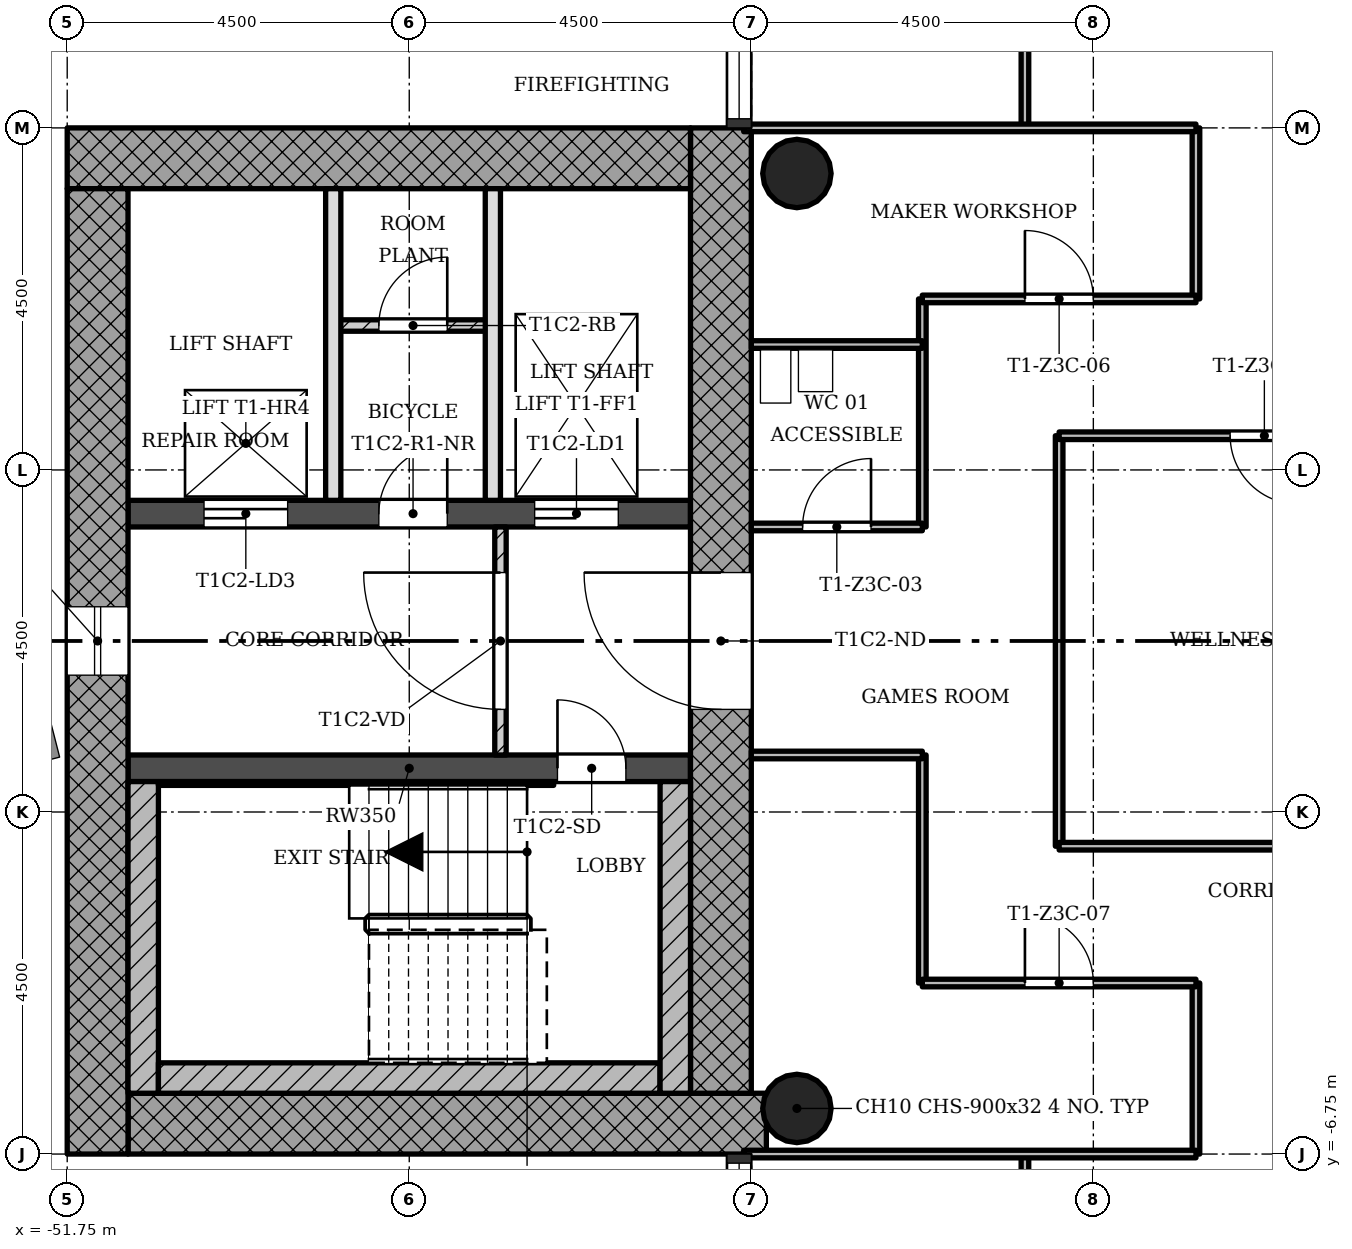
"""IFC4 building model, lengths in metres.
Left out: names, types, materials, properties, quantities, classifications, styles, units other than length and angle.
Written with IfcOpenShell. Run it as: python <this file> out.ifc"""

import sys

from ifc_helpers import new_model, si_unit, direction, frame, frame_2d, origin, origin_2d, place, context, subcontext, project, spatial, rectangle, hollow_circle, extrude, element, fill, save


model = new_model("IFC4")
c1 = context("Model", 3, precision=1e-05, world=origin(), true_north=direction((0.0, 1.0)))
c2 = subcontext(c1, "Body", "Model", "MODEL_VIEW")
j1 = project(units=[si_unit("LENGTHUNIT", "METRE"), si_unit("PLANEANGLEUNIT", "RADIAN")], contexts=[c1])
p1 = place(None, origin())
s1 = spatial("IfcSite", under=j1, at=p1, CompositionType="ELEMENT")
p2 = place(p1, origin())
s2 = spatial("IfcBuilding", under=s1, at=p2, CompositionType="ELEMENT")
p3 = place(p2, frame((0.0, 0.0, 157.5)))
s3 = spatial("IfcBuildingStorey", under=s2, at=p3, CompositionType="ELEMENT", Elevation=157.5)
p4 = place(p3, frame((-50.95, -6.35, 0.0), z_axis=(0.0, 0.0, 1.0), x_axis=(1.0, 0.0, 0.0)))
e1 = element("IfcWall", 1, at=p4, inside=s3, PredefinedType="SHEAR", context=c2, shape_type="SweptSolid", body=[
    extrude(rectangle(XDim=8.398, YDim=0.8, at=frame_2d((4.199, 0.0))), origin(), (0.0, 0.0, 1.0), 3.4),
])
p5 = place(p3, frame((-43.15, -5.95, 0.0), z_axis=(0.0, 0.0, 1.0), x_axis=(0.0, 1.0, 0.0)))
e2 = element("IfcWall", 2, at=p5, inside=s3, PredefinedType="SHEAR", context=c2, shape_type="SweptSolid", body=[
    extrude(rectangle(XDim=12.7, YDim=0.8, at=frame_2d((6.35, 0.0))), origin(), (0.0, 0.0, 1.0), 3.4),
])
p6 = place(p5, frame((5.05, 0.0, 0.0)))
e3 = element("IfcOpeningElement", 3, at=p6, cuts=e2, PredefinedType="OPENING", context=c2, shape_type="SweptSolid", body=[
    extrude(rectangle(XDim=1.8, YDim=2.1, at=frame_2d((0.9, 1.05))), frame((0.0, 0.41, 0.0), z_axis=(0.0, -1.0, 0.0), x_axis=(1.0, 0.0, 0.0)), (0.0, 0.0, 1.0), 0.82),
])
p7 = place(p3, frame((-43.55, 6.35, 0.0), z_axis=(0.0, 0.0, 1.0), x_axis=(-1.0, 0.0, 0.0)))
e4 = element("IfcWall", 4, at=p7, inside=s3, PredefinedType="SHEAR", context=c2, shape_type="SweptSolid", body=[
    extrude(rectangle(XDim=8.2, YDim=0.8, at=frame_2d((4.1, 0.0))), origin(), (0.0, 0.0, 1.0), 3.4),
])
p8 = place(p3, frame((-51.35, 5.95, 0.0), z_axis=(0.0, 0.0, 1.0), x_axis=(0.0, -1.0, 0.0)))
e5 = element("IfcWall", 5, at=p8, inside=s3, PredefinedType="SHEAR", context=c2, shape_type="SweptSolid", body=[
    extrude(rectangle(XDim=12.7, YDim=0.8, at=frame_2d((6.35, 0.0))), origin(), (0.0, 0.0, 1.0), 3.4),
])
p9 = place(p8, frame((5.5, 0.0, 0.45)))
e6 = element("IfcOpeningElement", 6, at=p9, cuts=e5, PredefinedType="OPENING", context=c2, shape_type="SweptSolid", body=[
    extrude(rectangle(XDim=0.9, YDim=2.4, at=frame_2d((0.45, 1.2))), frame((0.0, 0.41, 0.0), z_axis=(0.0, -1.0, 0.0), x_axis=(1.0, 0.0, 0.0)), (0.0, 0.0, 1.0), 0.82),
])
p10 = place(p3, frame((-50.95, -1.675, 0.0), z_axis=(0.0, 0.0, 1.0), x_axis=(1.0, 0.0, 0.0)))
e7 = element("IfcWall", 7, at=p10, inside=s3, PredefinedType="SHEAR", context=c2, shape_type="SweptSolid", body=[
    extrude(rectangle(XDim=7.4, YDim=0.35, at=frame_2d((3.7, 0.0))), origin(), (0.0, 0.0, 1.0), 3.4),
])
p11 = place(p10, frame((5.65, 0.0, 0.0)))
e8 = element("IfcOpeningElement", 8, at=p11, cuts=e7, PredefinedType="OPENING", context=c2, shape_type="SweptSolid", body=[
    extrude(rectangle(XDim=0.9, YDim=2.1, at=frame_2d((0.45, 1.05))), frame((0.0, 0.185, 0.0), z_axis=(0.0, -1.0, 0.0), x_axis=(1.0, 0.0, 0.0)), (0.0, 0.0, 1.0), 0.37),
])
p12 = place(p3, frame((-50.95, 1.675, 0.0), z_axis=(0.0, 0.0, 1.0), x_axis=(1.0, 0.0, 0.0)))
e9 = element("IfcWall", 9, at=p12, inside=s3, PredefinedType="SHEAR", context=c2, shape_type="SweptSolid", body=[
    extrude(rectangle(XDim=7.4, YDim=0.35, at=frame_2d((3.7, 0.0))), origin(), (0.0, 0.0, 1.0), 3.4),
])
p13 = place(p12, frame((5.35, 0.0, 0.0)))
e10 = element("IfcOpeningElement", 10, at=p13, cuts=e9, PredefinedType="OPENING", context=c2, shape_type="SweptSolid", body=[
    extrude(rectangle(XDim=1.1, YDim=2.1, at=frame_2d((0.55, 1.05))), frame((0.0, 0.185, 0.0), z_axis=(0.0, -1.0, 0.0), x_axis=(1.0, 0.0, 0.0)), (0.0, 0.0, 1.0), 0.37),
])
p14 = place(p12, frame((1.0, 0.0, 0.0)))
e11 = element("IfcOpeningElement", 11, at=p14, cuts=e9, PredefinedType="OPENING", context=c2, shape_type="SweptSolid", body=[
    extrude(rectangle(XDim=1.1, YDim=2.1, at=frame_2d((0.55, 1.05))), frame((0.0, 0.185, 0.0), z_axis=(0.0, -1.0, 0.0), x_axis=(1.0, 0.0, 0.0)), (0.0, 0.0, 1.0), 0.37),
])
p15 = place(p12, frame((3.3, 0.0, 0.0)))
e12 = element("IfcOpeningElement", 12, at=p15, cuts=e9, PredefinedType="OPENING", context=c2, shape_type="SweptSolid", body=[
    extrude(rectangle(XDim=0.9, YDim=2.1, at=frame_2d((0.45, 1.05))), frame((0.0, 0.185, 0.0), z_axis=(0.0, -1.0, 0.0), x_axis=(1.0, 0.0, 0.0)), (0.0, 0.0, 1.0), 0.37),
])
for number, where, z_axis, x_axis in (
    (13, (-42.15, -6.15, 0.0), (0.0, 0.0, 1.0), (1.0, 0.0, 0.0)),
    (14, (-42.15, 6.15, 0.0), (0.0, 0.0, 1.0), (1.0, 0.0, 0.0)),
):
    element("IfcColumn", number, at=place(p3, frame(where, z_axis=z_axis, x_axis=x_axis)), inside=s3, PredefinedType="COLUMN", context=c2, shape_type="SweptSolid", body=[
        extrude(hollow_circle(Radius=0.45, WallThickness=0.032, at=origin_2d()), origin(), (0.0, 0.0, 1.0), 3.4),
    ])
p16 = place(p3, frame((-46.05, 1.5, 0.0), z_axis=(0.0, 0.0, 1.0), x_axis=(0.0, -1.0, 0.0)))
e15 = element("IfcWall", 15, at=p16, inside=s3, PredefinedType="PARTITIONING", context=c2, shape_type="SweptSolid", body=[
    extrude(rectangle(XDim=3.0, YDim=0.15, at=frame_2d((1.5, 0.0))), origin(), (0.0, 0.0, 1.0), 3.0),
])
p17 = place(p16, frame((0.6, 0.0, 0.0)))
e16 = element("IfcOpeningElement", 16, at=p17, cuts=e15, PredefinedType="OPENING", context=c2, shape_type="SweptSolid", body=[
    extrude(rectangle(XDim=1.8, YDim=2.1, at=frame_2d((0.9, 1.05))), frame((0.0, 0.085, 0.0), z_axis=(0.0, -1.0, 0.0), x_axis=(1.0, 0.0, 0.0)), (0.0, 0.0, 1.0), 0.17),
])
for number, where, z_axis, x_axis in (
    (17, (-48.25, 5.95, 0.0), (0.0, 0.0, 1.0), (0.0, -1.0, 0.0)),
    (18, (-46.15, 5.95, 0.0), (0.0, 0.0, 1.0), (0.0, -1.0, 0.0)),
):
    element("IfcWall", number, at=place(p3, frame(where, z_axis=z_axis, x_axis=x_axis)), inside=s3, PredefinedType="SOLIDWALL", context=c2, shape_type="SweptSolid", body=[
        extrude(rectangle(XDim=4.1, YDim=0.2, at=frame_2d((2.05, 0.0))), origin(), (0.0, 0.0, 1.0), 3.0),
    ])
p18 = place(p3, frame((-46.15, 4.15, 0.0), z_axis=(0.0, 0.0, 1.0), x_axis=(-1.0, 0.0, 0.0)))
e19 = element("IfcWall", 19, at=p18, inside=s3, PredefinedType="PARTITIONING", context=c2, shape_type="SweptSolid", body=[
    extrude(rectangle(XDim=2.1, YDim=0.15, at=frame_2d((1.05, 0.0))), origin(), (0.0, 0.0, 1.0), 3.0),
])
p19 = place(p18, frame((0.6, 0.0, 0.0)))
e20 = element("IfcOpeningElement", 20, at=p19, cuts=e19, PredefinedType="OPENING", context=c2, shape_type="SweptSolid", body=[
    extrude(rectangle(XDim=0.9, YDim=2.1, at=frame_2d((0.45, 1.05))), frame((0.0, 0.085, 0.0), z_axis=(0.0, -1.0, 0.0), x_axis=(1.0, 0.0, 0.0)), (0.0, 0.0, 1.0), 0.17),
])
for number, where, z_axis, x_axis in (
    (21, (-40.5, -4.5, 0.0), (0.0, 0.0, 1.0), (0.0, 1.0, 0.0)),
    (22, (-40.5, 1.5, 0.0), (0.0, 0.0, 1.0), (0.0, 1.0, 0.0)),
):
    element("IfcWall", number, at=place(p3, frame(where, z_axis=z_axis, x_axis=x_axis)), inside=s3, PredefinedType="PARTITIONING", context=c2, shape_type="SweptSolid", body=[
        extrude(rectangle(XDim=3.0, YDim=0.1, at=frame_2d((1.5, 0.0))), origin(), (0.0, 0.0, 1.0), 3.0),
    ])
p20 = place(p3, frame((-39.15, -15.75, 0.0), z_axis=(0.0, 0.0, 1.0), x_axis=(0.0, 1.0, 0.0)))
e23 = element("IfcWall", 23, at=p20, inside=s3, PredefinedType="PARTITIONING", context=c2, shape_type="SweptSolid", body=[
    extrude(rectangle(XDim=9.0, YDim=0.1, at=frame_2d((4.5, 0.0))), origin(), (0.0, 0.0, 1.0), 3.0),
])
p21 = place(p20, frame((5.55, 0.0, 0.0)))
e24 = element("IfcOpeningElement", 24, at=p21, cuts=e23, PredefinedType="OPENING", context=c2, shape_type="SweptSolid", body=[
    extrude(rectangle(XDim=0.9, YDim=2.1, at=frame_2d((0.45, 1.05))), frame((0.0, 0.06, 0.0), z_axis=(0.0, -1.0, 0.0), x_axis=(1.0, 0.0, 0.0)), (0.0, 0.0, 1.0), 0.12),
])
p22 = place(p3, frame((-39.15, 6.75, 0.0), z_axis=(0.0, 0.0, 1.0), x_axis=(0.0, 1.0, 0.0)))
e25 = element("IfcWall", 25, at=p22, inside=s3, PredefinedType="PARTITIONING", context=c2, shape_type="SweptSolid", body=[
    extrude(rectangle(XDim=4.5, YDim=0.1, at=frame_2d((2.25, 0.0))), origin(), (0.0, 0.0, 1.0), 3.0),
])
p23 = place(p22, frame((1.8, 0.0, 0.0)))
e26 = element("IfcOpeningElement", 26, at=p23, cuts=e25, PredefinedType="OPENING", context=c2, shape_type="SweptSolid", body=[
    extrude(rectangle(XDim=0.9, YDim=2.1, at=frame_2d((0.45, 1.05))), frame((0.0, 0.06, 0.0), z_axis=(0.0, -1.0, 0.0), x_axis=(1.0, 0.0, 0.0)), (0.0, 0.0, 1.0), 0.12),
])
p24 = place(p3, frame((-38.7, -2.7, 0.0), z_axis=(0.0, 0.0, 1.0), x_axis=(0.0, 1.0, 0.0)))
e27 = element("IfcWall", 27, at=p24, inside=s3, PredefinedType="PARTITIONING", context=c2, shape_type="SweptSolid", body=[
    extrude(rectangle(XDim=5.4, YDim=0.1, at=frame_2d((2.7, 0.0))), origin(), (0.0, 0.0, 1.0), 3.0),
])
for number, where, z_axis, x_axis in (
    (28, (-36.9, -6.75, 0.0), (0.0, 0.0, 1.0), (0.0, 1.0, 0.0)),
    (29, (-36.9, 4.5, 0.0), (0.0, 0.0, 1.0), (0.0, 1.0, 0.0)),
):
    element("IfcWall", number, at=place(p3, frame(where, z_axis=z_axis, x_axis=x_axis)), inside=s3, PredefinedType="PARTITIONING", context=c2, shape_type="SweptSolid", body=[
        extrude(rectangle(XDim=2.25, YDim=0.1, at=frame_2d((1.125, 0.0))), origin(), (0.0, 0.0, 1.0), 3.0),
    ])
p25 = place(p3, frame((-42.85, -6.75, 0.0), z_axis=(0.0, 0.0, 1.0), x_axis=(1.0, 0.0, 0.0)))
e30 = element("IfcWall", 30, at=p25, inside=s3, PredefinedType="PARTITIONING", context=c2, shape_type="SweptSolid", body=[
    extrude(rectangle(XDim=5.95, YDim=0.1, at=frame_2d((2.975, 0.0))), origin(), (0.0, 0.0, 1.0), 3.0),
])
p26 = place(p3, frame((-40.5, -4.5, 0.0), z_axis=(0.0, 0.0, 1.0), x_axis=(1.0, 0.0, 0.0)))
e31 = element("IfcWall", 31, at=p26, inside=s3, PredefinedType="PARTITIONING", context=c2, shape_type="SweptSolid", body=[
    extrude(rectangle(XDim=3.6, YDim=0.1, at=frame_2d((1.8, 0.0))), origin(), (0.0, 0.0, 1.0), 3.0),
])
p27 = place(p26, frame((1.35, 0.0, 0.0)))
e32 = element("IfcOpeningElement", 32, at=p27, cuts=e31, PredefinedType="OPENING", context=c2, shape_type="SweptSolid", body=[
    extrude(rectangle(XDim=0.9, YDim=2.1, at=frame_2d((0.45, 1.05))), frame((0.0, 0.06, 0.0), z_axis=(0.0, -1.0, 0.0), x_axis=(1.0, 0.0, 0.0)), (0.0, 0.0, 1.0), 0.12),
])
p28 = place(p3, frame((-38.7, -2.7, 0.0), z_axis=(0.0, 0.0, 1.0), x_axis=(1.0, 0.0, 0.0)))
e33 = element("IfcWall", 33, at=p28, inside=s3, PredefinedType="PARTITIONING", context=c2, shape_type="SweptSolid", body=[
    extrude(rectangle(XDim=5.4, YDim=0.1, at=frame_2d((2.7, 0.0))), origin(), (0.0, 0.0, 1.0), 3.0),
])
p29 = place(p3, frame((-42.75, -1.5, 0.0), z_axis=(0.0, 0.0, 1.0), x_axis=(1.0, 0.0, 0.0)))
e34 = element("IfcWall", 34, at=p29, inside=s3, PredefinedType="PARTITIONING", context=c2, shape_type="SweptSolid", body=[
    extrude(rectangle(XDim=2.25, YDim=0.1, at=frame_2d((1.125, 0.0))), origin(), (0.0, 0.0, 1.0), 3.0),
])
p30 = place(p3, frame((-42.75, 1.5, 0.0), z_axis=(0.0, 0.0, 1.0), x_axis=(1.0, 0.0, 0.0)))
e35 = element("IfcWall", 35, at=p30, inside=s3, PredefinedType="PARTITIONING", context=c2, shape_type="SweptSolid", body=[
    extrude(rectangle(XDim=2.25, YDim=0.1, at=frame_2d((1.125, 0.0))), origin(), (0.0, 0.0, 1.0), 3.0),
])
p31 = place(p30, frame((0.675, 0.0, 0.0)))
e36 = element("IfcOpeningElement", 36, at=p31, cuts=e35, PredefinedType="OPENING", context=c2, shape_type="SweptSolid", body=[
    extrude(rectangle(XDim=0.9, YDim=2.1, at=frame_2d((0.45, 1.05))), frame((0.0, 0.06, 0.0), z_axis=(0.0, -1.0, 0.0), x_axis=(1.0, 0.0, 0.0)), (0.0, 0.0, 1.0), 0.12),
])
p32 = place(p3, frame((-38.7, 2.7, 0.0), z_axis=(0.0, 0.0, 1.0), x_axis=(1.0, 0.0, 0.0)))
e37 = element("IfcWall", 37, at=p32, inside=s3, PredefinedType="PARTITIONING", context=c2, shape_type="SweptSolid", body=[
    extrude(rectangle(XDim=5.4, YDim=0.1, at=frame_2d((2.7, 0.0))), origin(), (0.0, 0.0, 1.0), 3.0),
])
p33 = place(p32, frame((2.25, 0.0, 0.0)))
e38 = element("IfcOpeningElement", 38, at=p33, cuts=e37, PredefinedType="OPENING", context=c2, shape_type="SweptSolid", body=[
    extrude(rectangle(XDim=0.9, YDim=2.1, at=frame_2d((0.45, 1.05))), frame((0.0, 0.06, 0.0), z_axis=(0.0, -1.0, 0.0), x_axis=(1.0, 0.0, 0.0)), (0.0, 0.0, 1.0), 0.12),
])
p34 = place(p3, frame((-42.75, 3.9, 0.0), z_axis=(0.0, 0.0, 1.0), x_axis=(1.0, 0.0, 0.0)))
e39 = element("IfcWall", 39, at=p34, inside=s3, PredefinedType="PARTITIONING", context=c2, shape_type="SweptSolid", body=[
    extrude(rectangle(XDim=2.25, YDim=0.1, at=frame_2d((1.125, 0.0))), origin(), (0.0, 0.0, 1.0), 3.0),
])
p35 = place(p3, frame((-40.5, 4.5, 0.0), z_axis=(0.0, 0.0, 1.0), x_axis=(1.0, 0.0, 0.0)))
e40 = element("IfcWall", 40, at=p35, inside=s3, PredefinedType="PARTITIONING", context=c2, shape_type="SweptSolid", body=[
    extrude(rectangle(XDim=3.6, YDim=0.1, at=frame_2d((1.8, 0.0))), origin(), (0.0, 0.0, 1.0), 3.0),
])
p36 = place(p35, frame((1.35, 0.0, 0.0)))
e41 = element("IfcOpeningElement", 41, at=p36, cuts=e40, PredefinedType="OPENING", context=c2, shape_type="SweptSolid", body=[
    extrude(rectangle(XDim=0.9, YDim=2.1, at=frame_2d((0.45, 1.05))), frame((0.0, 0.06, 0.0), z_axis=(0.0, -1.0, 0.0), x_axis=(1.0, 0.0, 0.0)), (0.0, 0.0, 1.0), 0.12),
])
p37 = place(p3, frame((-42.85, 6.75, 0.0), z_axis=(0.0, 0.0, 1.0), x_axis=(1.0, 0.0, 0.0)))
e42 = element("IfcWall", 42, at=p37, inside=s3, PredefinedType="PARTITIONING", context=c2, shape_type="SweptSolid", body=[
    extrude(rectangle(XDim=5.95, YDim=0.1, at=frame_2d((2.975, 0.0))), origin(), (0.0, 0.0, 1.0), 3.0),
])
p38 = place(p3, frame((-50.75, -1.85, 0.0), z_axis=(0.0, 0.0, 1.0), x_axis=(0.0, -1.0, 0.0)))
e43 = element("IfcWall", 43, at=p38, inside=s3, PredefinedType="SHEAR", context=c2, shape_type="SweptSolid", body=[
    extrude(rectangle(XDim=4.1, YDim=0.4, at=frame_2d((2.05, 0.0))), origin(), (0.0, 0.0, 1.0), 3.4),
])
p39 = place(p3, frame((-43.95, -5.75, 0.0), z_axis=(0.0, 0.0, 1.0), x_axis=(-1.0, 0.0, 0.0)))
e44 = element("IfcWall", 44, at=p39, inside=s3, PredefinedType="SHEAR", context=c2, shape_type="SweptSolid", body=[
    extrude(rectangle(XDim=6.6, YDim=0.4, at=frame_2d((3.3, 0.0))), origin(), (0.0, 0.0, 1.0), 3.4),
])
p40 = place(p3, frame((-43.75, -1.85, 0.0), z_axis=(0.0, 0.0, 1.0), x_axis=(0.0, -1.0, 0.0)))
e45 = element("IfcWall", 45, at=p40, inside=s3, PredefinedType="SHEAR", context=c2, shape_type="SweptSolid", body=[
    extrude(rectangle(XDim=4.1, YDim=0.4, at=frame_2d((2.05, 0.0))), origin(), (0.0, 0.0, 1.0), 3.4),
])
p41 = place(p3, frame((-45.35, -1.875, 0.0), z_axis=(0.0, 0.0, 1.0), x_axis=(-1.0, 0.0, 0.0)))
e46 = element("IfcWall", 46, at=p41, inside=s3, PredefinedType="SHEAR", context=c2, shape_type="SweptSolid", body=[
    extrude(rectangle(XDim=5.2, YDim=0.05, at=frame_2d((2.6, 0.0))), origin(), (0.0, 0.0, 1.0), 3.4),
])
p42 = place(p9, origin())
e47 = element("IfcWindow", 47, at=p42, inside=s3, PartitioningType="SINGLE_PANEL", PredefinedType="WINDOW", context=c2, shape_type="SweptSolid", body=[
    extrude(rectangle(XDim=0.9, YDim=2.4, at=frame_2d((0.45, 1.2))), frame((0.0, 0.03, 0.0), z_axis=(0.0, -1.0, 0.0), x_axis=(1.0, 0.0, 0.0)), (0.0, 0.0, 1.0), 0.06),
])
fill(e6, e47)
p43 = place(p17, origin())
e48 = element("IfcDoor", 48, at=p43, inside=s3, OperationType="SINGLE_SWING_LEFT", PredefinedType="DOOR", context=c2, shape_type="SweptSolid", body=[
    extrude(rectangle(XDim=1.8, YDim=2.1, at=frame_2d((0.9, 1.05))), frame((0.0, 0.025, 0.0), z_axis=(0.0, -1.0, 0.0), x_axis=(1.0, 0.0, 0.0)), (0.0, 0.0, 1.0), 0.05),
])
fill(e16, e48)
p44 = place(p19, origin())
e49 = element("IfcDoor", 49, at=p44, inside=s3, OperationType="SINGLE_SWING_LEFT", PredefinedType="DOOR", context=c2, shape_type="SweptSolid", body=[
    extrude(rectangle(XDim=0.9, YDim=2.1, at=frame_2d((0.45, 1.05))), frame((0.0, 0.025, 0.0), z_axis=(0.0, -1.0, 0.0), x_axis=(1.0, 0.0, 0.0)), (0.0, 0.0, 1.0), 0.05),
])
fill(e20, e49)
p45 = place(p33, origin())
e50 = element("IfcDoor", 50, at=p45, inside=s3, OperationType="SINGLE_SWING_RIGHT", PredefinedType="DOOR", context=c2, shape_type="SweptSolid", body=[
    extrude(rectangle(XDim=0.9, YDim=2.1, at=frame_2d((0.45, 1.05))), frame((0.0, 0.025, 0.0), z_axis=(0.0, -1.0, 0.0), x_axis=(1.0, 0.0, 0.0)), (0.0, 0.0, 1.0), 0.05),
])
fill(e38, e50)
p46 = place(p31, origin())
e51 = element("IfcDoor", 51, at=p46, inside=s3, OperationType="SINGLE_SWING_LEFT", PredefinedType="DOOR", context=c2, shape_type="SweptSolid", body=[
    extrude(rectangle(XDim=0.9, YDim=2.1, at=frame_2d((0.45, 1.05))), frame((0.0, 0.025, 0.0), z_axis=(0.0, -1.0, 0.0), x_axis=(1.0, 0.0, 0.0)), (0.0, 0.0, 1.0), 0.05),
])
fill(e36, e51)
p47 = place(p36, origin())
e52 = element("IfcDoor", 52, at=p47, inside=s3, OperationType="SINGLE_SWING_RIGHT", PredefinedType="DOOR", context=c2, shape_type="SweptSolid", body=[
    extrude(rectangle(XDim=0.9, YDim=2.1, at=frame_2d((0.45, 1.05))), frame((0.0, 0.025, 0.0), z_axis=(0.0, -1.0, 0.0), x_axis=(1.0, 0.0, 0.0)), (0.0, 0.0, 1.0), 0.05),
])
fill(e41, e52)
p48 = place(p27, origin())
e53 = element("IfcDoor", 53, at=p48, inside=s3, OperationType="SINGLE_SWING_RIGHT", PredefinedType="DOOR", context=c2, shape_type="SweptSolid", body=[
    extrude(rectangle(XDim=0.9, YDim=2.1, at=frame_2d((0.45, 1.05))), frame((0.0, 0.025, 0.0), z_axis=(0.0, -1.0, 0.0), x_axis=(1.0, 0.0, 0.0)), (0.0, 0.0, 1.0), 0.05),
])
fill(e32, e53)
p49 = place(p11, origin())
e54 = element("IfcDoor", 54, at=p49, inside=s3, OperationType="SINGLE_SWING_RIGHT", PredefinedType="DOOR", context=c2, shape_type="SweptSolid", body=[
    extrude(rectangle(XDim=0.9, YDim=2.1, at=frame_2d((0.45, 1.05))), frame((0.0, 0.025, 0.0), z_axis=(0.0, -1.0, 0.0), x_axis=(1.0, 0.0, 0.0)), (0.0, 0.0, 1.0), 0.05),
])
fill(e8, e54)
p50 = place(p13, origin())
e55 = element("IfcDoor", 55, at=p50, inside=s3, OperationType="SLIDING_TO_LEFT", PredefinedType="DOOR", context=c2, shape_type="SweptSolid", body=[
    extrude(rectangle(XDim=1.1, YDim=2.1, at=frame_2d((0.55, 1.05))), frame((0.0, 0.025, 0.0), z_axis=(0.0, -1.0, 0.0), x_axis=(1.0, 0.0, 0.0)), (0.0, 0.0, 1.0), 0.05),
])
fill(e10, e55)
p51 = place(p14, origin())
e56 = element("IfcDoor", 56, at=p51, inside=s3, OperationType="SLIDING_TO_LEFT", PredefinedType="DOOR", context=c2, shape_type="SweptSolid", body=[
    extrude(rectangle(XDim=1.1, YDim=2.1, at=frame_2d((0.55, 1.05))), frame((0.0, 0.025, 0.0), z_axis=(0.0, -1.0, 0.0), x_axis=(1.0, 0.0, 0.0)), (0.0, 0.0, 1.0), 0.05),
])
fill(e11, e56)
p52 = place(p15, origin())
e57 = element("IfcDoor", 57, at=p52, inside=s3, OperationType="SINGLE_SWING_LEFT", PredefinedType="DOOR", context=c2, shape_type="SweptSolid", body=[
    extrude(rectangle(XDim=0.9, YDim=2.1, at=frame_2d((0.45, 1.05))), frame((0.0, 0.025, 0.0), z_axis=(0.0, -1.0, 0.0), x_axis=(1.0, 0.0, 0.0)), (0.0, 0.0, 1.0), 0.05),
])
fill(e12, e57)
p53 = place(p6, origin())
e58 = element("IfcDoor", 58, at=p53, inside=s3, OperationType="SINGLE_SWING_LEFT", PredefinedType="DOOR", context=c2, shape_type="SweptSolid", body=[
    extrude(rectangle(XDim=1.8, YDim=2.1, at=frame_2d((0.9, 1.05))), frame((0.0, 0.025, 0.0), z_axis=(0.0, -1.0, 0.0), x_axis=(1.0, 0.0, 0.0)), (0.0, 0.0, 1.0), 0.05),
])
fill(e3, e58)
save(model, sys.argv[1])
